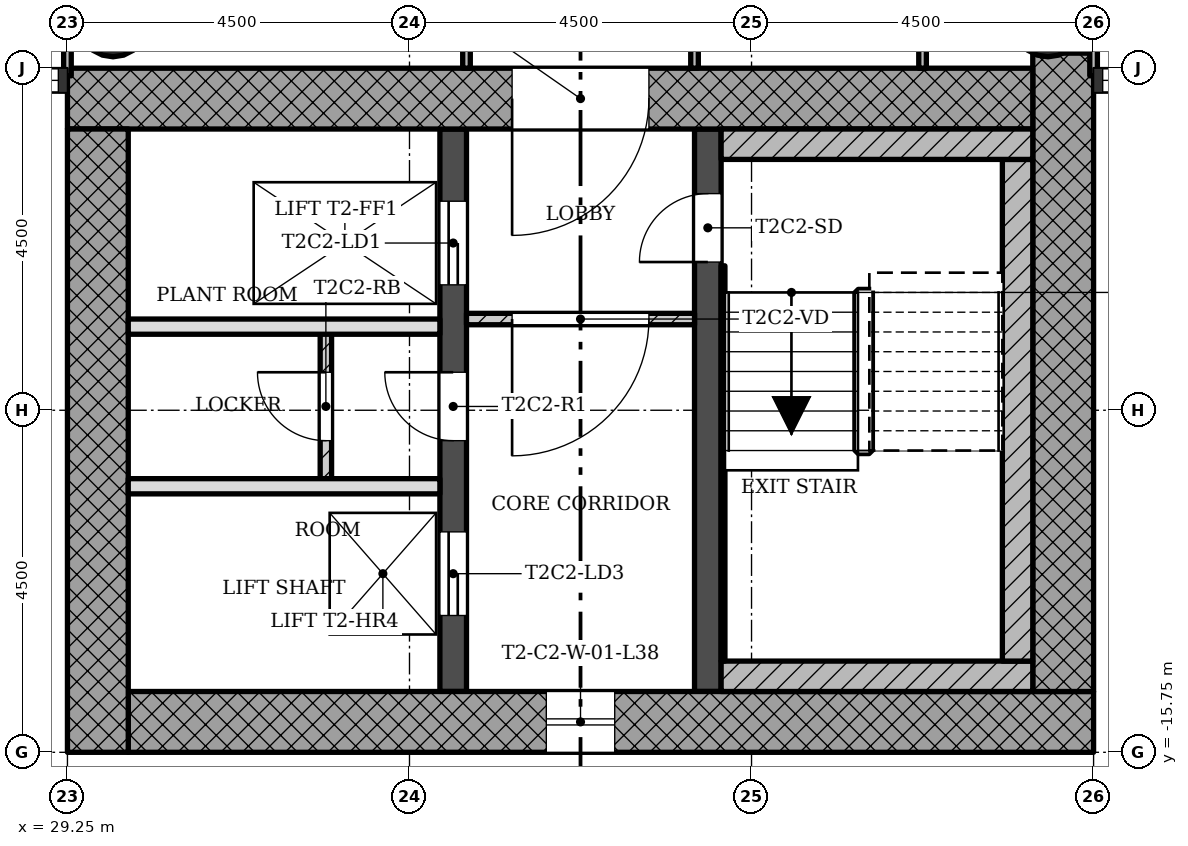
"""IFC4 building model, lengths in metres.
Left out: names, types, materials, properties, quantities, classifications, styles, units other than length and angle.
Written with IfcOpenShell. Run it as: python <this file> out.ifc"""

import sys

from ifc_helpers import new_model, si_unit, direction, frame, frame_2d, origin, origin_2d, place, context, subcontext, project, spatial, rectangle, hollow_circle, extrude, element, fill, save


model = new_model("IFC4")
c1 = context("Model", 3, precision=1e-05, world=origin(), true_north=direction((0.0, 1.0)))
c2 = subcontext(c1, "Body", "Model", "MODEL_VIEW")
j1 = project(units=[si_unit("LENGTHUNIT", "METRE"), si_unit("PLANEANGLEUNIT", "RADIAN")], contexts=[c1])
p1 = place(None, origin())
s1 = spatial("IfcSite", under=j1, at=p1, CompositionType="ELEMENT")
p2 = place(p1, origin())
s2 = spatial("IfcBuilding", under=s1, at=p2, CompositionType="ELEMENT")
p3 = place(p2, frame((0.0, 0.0, 140.5)))
s3 = spatial("IfcBuildingStorey", under=s2, at=p3, CompositionType="ELEMENT", Elevation=140.5)
p4 = place(p3, frame((30.05, -15.35, 0.0), z_axis=(0.0, 0.0, 1.0), x_axis=(1.0, 0.0, 0.0)))
e1 = element("IfcWall", 1, at=p4, inside=s3, PredefinedType="SHEAR", context=c2, shape_type="SweptSolid", body=[
    extrude(rectangle(XDim=12.7, YDim=0.8, at=frame_2d((6.35, 0.0))), origin(), (0.0, 0.0, 1.0), 3.4),
])
p5 = place(p4, frame((5.5, 0.0, 0.45)))
e2 = element("IfcOpeningElement", 2, at=p5, cuts=e1, PredefinedType="OPENING", context=c2, shape_type="SweptSolid", body=[
    extrude(rectangle(XDim=0.9, YDim=2.4, at=frame_2d((0.45, 1.2))), frame((0.0, 0.41, 0.0), z_axis=(0.0, -1.0, 0.0), x_axis=(1.0, 0.0, 0.0)), (0.0, 0.0, 1.0), 0.82),
])
p6 = place(p3, frame((42.35, -14.95, 0.0), z_axis=(0.0, 0.0, 1.0), x_axis=(0.0, 1.0, 0.0)))
e3 = element("IfcWall", 3, at=p6, inside=s3, PredefinedType="SHEAR", context=c2, shape_type="SweptSolid", body=[
    extrude(rectangle(XDim=8.398, YDim=0.8, at=frame_2d((4.199, 0.0))), origin(), (0.0, 0.0, 1.0), 3.4),
])
p7 = place(p3, frame((41.95, -7.15, 0.0), z_axis=(0.0, 0.0, 1.0), x_axis=(-1.0, 0.0, 0.0)))
e4 = element("IfcWall", 4, at=p7, inside=s3, PredefinedType="SHEAR", context=c2, shape_type="SweptSolid", body=[
    extrude(rectangle(XDim=12.7, YDim=0.8, at=frame_2d((6.35, 0.0))), origin(), (0.0, 0.0, 1.0), 3.4),
])
p8 = place(p7, frame((5.05, 0.0, 0.0)))
e5 = element("IfcOpeningElement", 5, at=p8, cuts=e4, PredefinedType="OPENING", context=c2, shape_type="SweptSolid", body=[
    extrude(rectangle(XDim=1.8, YDim=2.1, at=frame_2d((0.9, 1.05))), frame((0.0, 0.41, 0.0), z_axis=(0.0, -1.0, 0.0), x_axis=(1.0, 0.0, 0.0)), (0.0, 0.0, 1.0), 0.82),
])
p9 = place(p3, frame((29.65, -7.55, 0.0), z_axis=(0.0, 0.0, 1.0), x_axis=(0.0, -1.0, 0.0)))
e6 = element("IfcWall", 6, at=p9, inside=s3, PredefinedType="SHEAR", context=c2, shape_type="SweptSolid", body=[
    extrude(rectangle(XDim=8.2, YDim=0.8, at=frame_2d((4.1, 0.0))), origin(), (0.0, 0.0, 1.0), 3.4),
])
p10 = place(p3, frame((34.325, -14.95, 0.0), z_axis=(0.0, 0.0, 1.0), x_axis=(0.0, 1.0, 0.0)))
e7 = element("IfcWall", 7, at=p10, inside=s3, PredefinedType="SHEAR", context=c2, shape_type="SweptSolid", body=[
    extrude(rectangle(XDim=7.4, YDim=0.35, at=frame_2d((3.7, 0.0))), origin(), (0.0, 0.0, 1.0), 3.4),
])
p11 = place(p10, frame((5.35, 0.0, 0.0)))
e8 = element("IfcOpeningElement", 8, at=p11, cuts=e7, PredefinedType="OPENING", context=c2, shape_type="SweptSolid", body=[
    extrude(rectangle(XDim=1.1, YDim=2.1, at=frame_2d((0.55, 1.05))), frame((0.0, 0.185, 0.0), z_axis=(0.0, -1.0, 0.0), x_axis=(1.0, 0.0, 0.0)), (0.0, 0.0, 1.0), 0.37),
])
p12 = place(p10, frame((1.0, 0.0, 0.0)))
e9 = element("IfcOpeningElement", 9, at=p12, cuts=e7, PredefinedType="OPENING", context=c2, shape_type="SweptSolid", body=[
    extrude(rectangle(XDim=1.1, YDim=2.1, at=frame_2d((0.55, 1.05))), frame((0.0, 0.185, 0.0), z_axis=(0.0, -1.0, 0.0), x_axis=(1.0, 0.0, 0.0)), (0.0, 0.0, 1.0), 0.37),
])
p13 = place(p10, frame((3.3, 0.0, 0.0)))
e10 = element("IfcOpeningElement", 10, at=p13, cuts=e7, PredefinedType="OPENING", context=c2, shape_type="SweptSolid", body=[
    extrude(rectangle(XDim=0.9, YDim=2.1, at=frame_2d((0.45, 1.05))), frame((0.0, 0.185, 0.0), z_axis=(0.0, -1.0, 0.0), x_axis=(1.0, 0.0, 0.0)), (0.0, 0.0, 1.0), 0.37),
])
p14 = place(p3, frame((37.675, -14.95, 0.0), z_axis=(0.0, 0.0, 1.0), x_axis=(0.0, 1.0, 0.0)))
e11 = element("IfcWall", 11, at=p14, inside=s3, PredefinedType="SHEAR", context=c2, shape_type="SweptSolid", body=[
    extrude(rectangle(XDim=7.4, YDim=0.35, at=frame_2d((3.7, 0.0))), origin(), (0.0, 0.0, 1.0), 3.4),
])
p15 = place(p14, frame((5.65, 0.0, 0.0)))
e12 = element("IfcOpeningElement", 12, at=p15, cuts=e11, PredefinedType="OPENING", context=c2, shape_type="SweptSolid", body=[
    extrude(rectangle(XDim=0.9, YDim=2.1, at=frame_2d((0.45, 1.05))), frame((0.0, 0.185, 0.0), z_axis=(0.0, -1.0, 0.0), x_axis=(1.0, 0.0, 0.0)), (0.0, 0.0, 1.0), 0.37),
])
for number, where, z_axis, x_axis in (
    (13, (42.15, -6.15, 0.0), (0.0, 0.0, 1.0), (1.0, 0.0, 0.0)),
    (14, (29.85, -6.15, 0.0), (0.0, 0.0, 1.0), (1.0, 0.0, 0.0)),
):
    element("IfcColumn", number, at=place(p3, frame(where, z_axis=z_axis, x_axis=x_axis)), inside=s3, PredefinedType="COLUMN", context=c2, shape_type="SweptSolid", body=[
        extrude(hollow_circle(Radius=0.45, WallThickness=0.032, at=origin_2d()), origin(), (0.0, 0.0, 1.0), 3.4),
    ])
p16 = place(p3, frame((34.5, -10.05, 0.0), z_axis=(0.0, 0.0, 1.0), x_axis=(1.0, 0.0, 0.0)))
e15 = element("IfcWall", 15, at=p16, inside=s3, PredefinedType="PARTITIONING", context=c2, shape_type="SweptSolid", body=[
    extrude(rectangle(XDim=3.0, YDim=0.15, at=frame_2d((1.5, 0.0))), origin(), (0.0, 0.0, 1.0), 3.0),
])
p17 = place(p16, frame((0.6, 0.0, 0.0)))
e16 = element("IfcOpeningElement", 16, at=p17, cuts=e15, PredefinedType="OPENING", context=c2, shape_type="SweptSolid", body=[
    extrude(rectangle(XDim=1.8, YDim=2.1, at=frame_2d((0.9, 1.05))), frame((0.0, 0.085, 0.0), z_axis=(0.0, -1.0, 0.0), x_axis=(1.0, 0.0, 0.0)), (0.0, 0.0, 1.0), 0.17),
])
for number, where, z_axis, x_axis in (
    (17, (30.05, -12.25, 0.0), (0.0, 0.0, 1.0), (1.0, 0.0, 0.0)),
    (18, (30.05, -10.15, 0.0), (0.0, 0.0, 1.0), (1.0, 0.0, 0.0)),
):
    element("IfcWall", number, at=place(p3, frame(where, z_axis=z_axis, x_axis=x_axis)), inside=s3, PredefinedType="SOLIDWALL", context=c2, shape_type="SweptSolid", body=[
        extrude(rectangle(XDim=4.1, YDim=0.2, at=frame_2d((2.05, 0.0))), origin(), (0.0, 0.0, 1.0), 3.0),
    ])
p18 = place(p3, frame((32.65, -10.15, 0.0), z_axis=(0.0, 0.0, 1.0), x_axis=(0.0, -1.0, 0.0)))
e19 = element("IfcWall", 19, at=p18, inside=s3, PredefinedType="PARTITIONING", context=c2, shape_type="SweptSolid", body=[
    extrude(rectangle(XDim=2.1, YDim=0.15, at=frame_2d((1.05, 0.0))), origin(), (0.0, 0.0, 1.0), 3.0),
])
p19 = place(p18, frame((0.6, 0.0, 0.0)))
e20 = element("IfcOpeningElement", 20, at=p19, cuts=e19, PredefinedType="OPENING", context=c2, shape_type="SweptSolid", body=[
    extrude(rectangle(XDim=0.9, YDim=2.1, at=frame_2d((0.45, 1.05))), frame((0.0, 0.085, 0.0), z_axis=(0.0, -1.0, 0.0), x_axis=(1.0, 0.0, 0.0)), (0.0, 0.0, 1.0), 0.17),
])
p20 = place(p3, frame((42.75, -6.85, 0.0), z_axis=(0.0, 0.0, 1.0), x_axis=(0.0, 1.0, 0.0)))
e21 = element("IfcWall", 21, at=p20, inside=s3, PredefinedType="PARTITIONING", context=c2, shape_type="SweptSolid", body=[
    extrude(rectangle(XDim=5.95, YDim=0.1, at=frame_2d((2.975, 0.0))), origin(), (0.0, 0.0, 1.0), 3.0),
])
p21 = place(p3, frame((40.5, -6.75, 0.0), z_axis=(0.0, 0.0, 1.0), x_axis=(0.0, 1.0, 0.0)))
e22 = element("IfcWall", 22, at=p21, inside=s3, PredefinedType="PARTITIONING", context=c2, shape_type="SweptSolid", body=[
    extrude(rectangle(XDim=5.85, YDim=0.1, at=frame_2d((2.925, 0.0))), origin(), (0.0, 0.0, 1.0), 3.0),
])
p22 = place(p21, frame((3.6, 0.0, 0.0)))
e23 = element("IfcOpeningElement", 23, at=p22, cuts=e22, PredefinedType="OPENING", context=c2, shape_type="SweptSolid", body=[
    extrude(rectangle(XDim=0.9, YDim=2.1, at=frame_2d((0.45, 1.05))), frame((0.0, 0.06, 0.0), z_axis=(0.0, -1.0, 0.0), x_axis=(1.0, 0.0, 0.0)), (0.0, 0.0, 1.0), 0.12),
])
for number, where, z_axis, x_axis in (
    (24, (37.5, -6.75, 0.0), (0.0, 0.0, 1.0), (0.0, 1.0, 0.0)),
    (25, (34.5, -6.75, 0.0), (0.0, 0.0, 1.0), (0.0, 1.0, 0.0)),
):
    element("IfcWall", number, at=place(p3, frame(where, z_axis=z_axis, x_axis=x_axis)), inside=s3, PredefinedType="PARTITIONING", context=c2, shape_type="SweptSolid", body=[
        extrude(rectangle(XDim=2.25, YDim=0.1, at=frame_2d((1.125, 0.0))), origin(), (0.0, 0.0, 1.0), 3.0),
    ])
p23 = place(p3, frame((29.25, -6.85, 0.0), z_axis=(0.0, 0.0, 1.0), x_axis=(0.0, 1.0, 0.0)))
e26 = element("IfcWall", 26, at=p23, inside=s3, PredefinedType="PARTITIONING", context=c2, shape_type="SweptSolid", body=[
    extrude(rectangle(XDim=5.95, YDim=0.1, at=frame_2d((2.975, 0.0))), origin(), (0.0, 0.0, 1.0), 3.0),
])
p24 = place(p3, frame((37.85, -14.75, 0.0), z_axis=(0.0, 0.0, 1.0), x_axis=(1.0, 0.0, 0.0)))
e27 = element("IfcWall", 27, at=p24, inside=s3, PredefinedType="SHEAR", context=c2, shape_type="SweptSolid", body=[
    extrude(rectangle(XDim=4.1, YDim=0.4, at=frame_2d((2.05, 0.0))), origin(), (0.0, 0.0, 1.0), 3.4),
])
p25 = place(p3, frame((41.75, -7.95, 0.0), z_axis=(0.0, 0.0, 1.0), x_axis=(0.0, -1.0, 0.0)))
e28 = element("IfcWall", 28, at=p25, inside=s3, PredefinedType="SHEAR", context=c2, shape_type="SweptSolid", body=[
    extrude(rectangle(XDim=6.6, YDim=0.4, at=frame_2d((3.3, 0.0))), origin(), (0.0, 0.0, 1.0), 3.4),
])
p26 = place(p3, frame((37.85, -7.75, 0.0), z_axis=(0.0, 0.0, 1.0), x_axis=(1.0, 0.0, 0.0)))
e29 = element("IfcWall", 29, at=p26, inside=s3, PredefinedType="SHEAR", context=c2, shape_type="SweptSolid", body=[
    extrude(rectangle(XDim=4.1, YDim=0.4, at=frame_2d((2.05, 0.0))), origin(), (0.0, 0.0, 1.0), 3.4),
])
p27 = place(p3, frame((37.875, -9.35, 0.0), z_axis=(0.0, 0.0, 1.0), x_axis=(0.0, -1.0, 0.0)))
e30 = element("IfcWall", 30, at=p27, inside=s3, PredefinedType="SHEAR", context=c2, shape_type="SweptSolid", body=[
    extrude(rectangle(XDim=5.2, YDim=0.05, at=frame_2d((2.6, 0.0))), origin(), (0.0, 0.0, 1.0), 3.4),
])
p28 = place(p5, origin())
e31 = element("IfcWindow", 31, at=p28, inside=s3, PartitioningType="SINGLE_PANEL", PredefinedType="WINDOW", context=c2, shape_type="SweptSolid", body=[
    extrude(rectangle(XDim=0.9, YDim=2.4, at=frame_2d((0.45, 1.2))), frame((0.0, 0.03, 0.0), z_axis=(0.0, -1.0, 0.0), x_axis=(1.0, 0.0, 0.0)), (0.0, 0.0, 1.0), 0.06),
])
fill(e2, e31)
p29 = place(p17, origin())
e32 = element("IfcDoor", 32, at=p29, inside=s3, OperationType="SINGLE_SWING_LEFT", PredefinedType="DOOR", context=c2, shape_type="SweptSolid", body=[
    extrude(rectangle(XDim=1.8, YDim=2.1, at=frame_2d((0.9, 1.05))), frame((0.0, 0.025, 0.0), z_axis=(0.0, -1.0, 0.0), x_axis=(1.0, 0.0, 0.0)), (0.0, 0.0, 1.0), 0.05),
])
fill(e16, e32)
p30 = place(p19, origin())
e33 = element("IfcDoor", 33, at=p30, inside=s3, OperationType="SINGLE_SWING_LEFT", PredefinedType="DOOR", context=c2, shape_type="SweptSolid", body=[
    extrude(rectangle(XDim=0.9, YDim=2.1, at=frame_2d((0.45, 1.05))), frame((0.0, 0.025, 0.0), z_axis=(0.0, -1.0, 0.0), x_axis=(1.0, 0.0, 0.0)), (0.0, 0.0, 1.0), 0.05),
])
fill(e20, e33)
p31 = place(p15, origin())
e34 = element("IfcDoor", 34, at=p31, inside=s3, OperationType="SINGLE_SWING_RIGHT", PredefinedType="DOOR", context=c2, shape_type="SweptSolid", body=[
    extrude(rectangle(XDim=0.9, YDim=2.1, at=frame_2d((0.45, 1.05))), frame((0.0, 0.025, 0.0), z_axis=(0.0, -1.0, 0.0), x_axis=(1.0, 0.0, 0.0)), (0.0, 0.0, 1.0), 0.05),
])
fill(e12, e34)
p32 = place(p11, origin())
e35 = element("IfcDoor", 35, at=p32, inside=s3, OperationType="SLIDING_TO_LEFT", PredefinedType="DOOR", context=c2, shape_type="SweptSolid", body=[
    extrude(rectangle(XDim=1.1, YDim=2.1, at=frame_2d((0.55, 1.05))), frame((0.0, 0.025, 0.0), z_axis=(0.0, -1.0, 0.0), x_axis=(1.0, 0.0, 0.0)), (0.0, 0.0, 1.0), 0.05),
])
fill(e8, e35)
p33 = place(p12, origin())
e36 = element("IfcDoor", 36, at=p33, inside=s3, OperationType="SLIDING_TO_LEFT", PredefinedType="DOOR", context=c2, shape_type="SweptSolid", body=[
    extrude(rectangle(XDim=1.1, YDim=2.1, at=frame_2d((0.55, 1.05))), frame((0.0, 0.025, 0.0), z_axis=(0.0, -1.0, 0.0), x_axis=(1.0, 0.0, 0.0)), (0.0, 0.0, 1.0), 0.05),
])
fill(e9, e36)
p34 = place(p13, origin())
e37 = element("IfcDoor", 37, at=p34, inside=s3, OperationType="SINGLE_SWING_LEFT", PredefinedType="DOOR", context=c2, shape_type="SweptSolid", body=[
    extrude(rectangle(XDim=0.9, YDim=2.1, at=frame_2d((0.45, 1.05))), frame((0.0, 0.025, 0.0), z_axis=(0.0, -1.0, 0.0), x_axis=(1.0, 0.0, 0.0)), (0.0, 0.0, 1.0), 0.05),
])
fill(e10, e37)
p35 = place(p8, origin())
e38 = element("IfcDoor", 38, at=p35, inside=s3, OperationType="SINGLE_SWING_LEFT", PredefinedType="DOOR", context=c2, shape_type="SweptSolid", body=[
    extrude(rectangle(XDim=1.8, YDim=2.1, at=frame_2d((0.9, 1.05))), frame((0.0, 0.025, 0.0), z_axis=(0.0, -1.0, 0.0), x_axis=(1.0, 0.0, 0.0)), (0.0, 0.0, 1.0), 0.05),
])
fill(e5, e38)
save(model, sys.argv[1])
